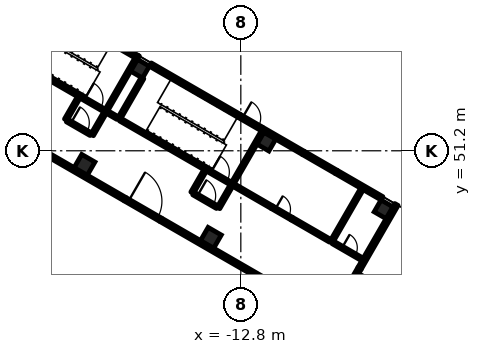
"""IFC4 building model, lengths in metres.
Left out: names, types, materials, properties, quantities, classifications, styles, units other than length and angle.
Written with IfcOpenShell. Run it as: python <this file> out.ifc"""

import sys

from ifc_helpers import new_model, si_unit, direction, frame, frame_2d, origin, origin_2d, place, context, subcontext, project, spatial, rectangle, extrude, element, fill, save


model = new_model("IFC4")
c1 = context("Model", 3, precision=1e-05, world=origin(), true_north=direction((0.0, 1.0)))
c2 = subcontext(c1, "Body", "Model", "MODEL_VIEW")
j1 = project(units=[si_unit("LENGTHUNIT", "METRE"), si_unit("PLANEANGLEUNIT", "RADIAN")], contexts=[c1])
p1 = place(None, origin())
s1 = spatial("IfcSite", under=j1, at=p1, CompositionType="ELEMENT")
p2 = place(p1, origin())
s2 = spatial("IfcBuilding", under=s1, at=p2, CompositionType="ELEMENT")
p3 = place(p2, origin())
s3 = spatial("IfcBuildingStorey", under=s2, at=p3, CompositionType="ELEMENT", Elevation=0.0)
for number, where, z_axis, x_axis in (
    (1, (-3.41, 47.349, -0.3), (0.0, 0.0, 1.0), (-0.5, -0.866, 0.0)),
    (2, (-11.118, 51.799, -0.3), (0.0, 0.0, 1.0), (-0.5, -0.866, 0.0)),
    (3, (-19.432, 56.599, -0.3), (0.0, 0.0, 1.0), (-0.5, -0.866, 0.0)),
):
    element("IfcColumn", number, at=place(p3, frame(where, z_axis=z_axis, x_axis=x_axis)), inside=s3, PredefinedType="COLUMN", context=c2, shape_type="SweptSolid", body=[
        extrude(rectangle(XDim=0.9, YDim=0.9, at=origin_2d()), origin(), (0.0, 0.0, 1.0), 6.3),
    ])
for number, where, z_axis, x_axis in (
    (4, (-14.768, 45.477, -0.3), (0.0, 0.0, 1.0), (-0.5, -0.866, 0.0)),
    (5, (-23.082, 50.277, -0.3), (0.0, 0.0, 1.0), (-0.5, -0.866, 0.0)),
):
    element("IfcColumn", number, at=place(p3, frame(where, z_axis=z_axis, x_axis=x_axis)), inside=s3, PredefinedType="COLUMN", context=c2, shape_type="SweptSolid", body=[
        extrude(rectangle(XDim=1.0, YDim=1.0, at=origin_2d()), origin(), (0.0, 0.0, 1.0), 6.3),
    ])
p4 = place(p3, frame((-2.562, 47.667, 0.0), z_axis=(0.0, 0.0, 1.0), x_axis=(-0.500010041276, -0.866019606374, 0.0)))
e6 = element("IfcWall", 6, at=p4, inside=s3, PredefinedType="SOLIDWALL", context=c2, shape_type="SweptSolid", body=[
    extrude(rectangle(XDim=4.85, YDim=0.25, at=frame_2d((2.425, 0.0))), origin(), (0.0, 0.0, 1.0), 5.7),
])
p5 = place(p3, frame((-4.988, 43.467, 0.0), z_axis=(0.0, 0.0, 1.0), x_axis=(-0.500031774688, -0.866007057882, 0.0)))
e7 = element("IfcWall", 7, at=p5, inside=s3, PredefinedType="SOLIDWALL", context=c2, shape_type="SweptSolid", body=[
    extrude(rectangle(XDim=2.3, YDim=0.25, at=frame_2d((1.15, 0.0))), origin(), (0.0, 0.0, 1.0), 5.7),
])
p6 = place(p5, frame((0.25, 0.0, 0.0)))
e8 = element("IfcOpeningElement", 8, at=p6, cuts=e7, PredefinedType="OPENING", context=c2, shape_type="SweptSolid", body=[
    extrude(rectangle(XDim=1.8, YDim=2.1, at=frame_2d((0.9, 1.05))), frame((0.0, 0.135, 0.0), z_axis=(0.0, -1.0, 0.0), x_axis=(1.0, 0.0, 0.0)), (0.0, 0.0, 1.0), 0.27),
])
p7 = place(p3, frame((-6.522, 49.809, 0.0), z_axis=(0.0, 0.0, 1.0), x_axis=(0.866055725969, -0.499947476758, 0.0)))
e9 = element("IfcWall", 9, at=p7, inside=s3, PredefinedType="SOLIDWALL", context=c2, shape_type="SweptSolid", body=[
    extrude(rectangle(XDim=3.475, YDim=0.25, at=frame_2d((1.737, 0.0))), origin(), (0.0, 0.0, 1.0), 5.7),
])
p8 = place(p3, frame((-8.687, 51.059, 0.0), z_axis=(0.0, 0.0, 1.0), x_axis=(0.866022959057, -0.500004234368, 0.0)))
e10 = element("IfcWall", 10, at=p8, inside=s3, PredefinedType="SOLIDWALL", context=c2, shape_type="SweptSolid", body=[
    extrude(rectangle(XDim=2.5, YDim=0.25, at=frame_2d((1.25, 0.0))), origin(), (0.0, 0.0, 1.0), 5.7),
])
p9 = place(p8, frame((0.25, 0.0, 0.3)))
e11 = element("IfcOpeningElement", 11, at=p9, cuts=e10, PredefinedType="OPENING", context=c2, shape_type="SweptSolid", body=[
    extrude(rectangle(XDim=2.0, YDim=2.4, at=frame_2d((1.0, 1.2))), frame((0.0, 0.135, 0.0), z_axis=(0.0, -1.0, 0.0), x_axis=(1.0, 0.0, 0.0)), (0.0, 0.0, 1.0), 0.27),
])
p10 = place(p3, frame((-11.437, 52.647, 0.0), z_axis=(0.0, 0.0, 1.0), x_axis=(0.866015284814, -0.500017526161, 0.0)))
e12 = element("IfcWall", 12, at=p10, inside=s3, PredefinedType="SOLIDWALL", context=c2, shape_type="SweptSolid", body=[
    extrude(rectangle(XDim=3.175, YDim=0.25, at=frame_2d((1.588, 0.0))), origin(), (0.0, 0.0, 1.0), 5.7),
])
p11 = place(p3, frame((-12.909, 53.497, 0.0), z_axis=(0.0, 0.0, 1.0), x_axis=(0.86605165483, -0.499954529098, 0.0)))
e13 = element("IfcWall", 13, at=p11, inside=s3, PredefinedType="SOLIDWALL", context=c2, shape_type="SweptSolid", body=[
    extrude(rectangle(XDim=1.7, YDim=0.25, at=frame_2d((0.85, 0.0))), origin(), (0.0, 0.0, 1.0), 5.7),
])
p12 = place(p11, frame((0.25, 0.0, 0.0)))
e14 = element("IfcOpeningElement", 14, at=p12, cuts=e13, PredefinedType="OPENING", context=c2, shape_type="SweptSolid", body=[
    extrude(rectangle(XDim=1.2, YDim=2.1, at=frame_2d((0.6, 1.05))), frame((0.0, 0.135, 0.0), z_axis=(0.0, -1.0, 0.0), x_axis=(1.0, 0.0, 0.0)), (0.0, 0.0, 1.0), 0.27),
])
p13 = place(p3, frame((-18.755, 56.872, 0.0), z_axis=(0.0, 0.0, 1.0), x_axis=(0.866026575979, -0.499997969693, 0.0)))
e15 = element("IfcWall", 15, at=p13, inside=s3, PredefinedType="SOLIDWALL", context=c2, shape_type="SweptSolid", body=[
    extrude(rectangle(XDim=6.75, YDim=0.25, at=frame_2d((3.375, 0.0))), origin(), (0.0, 0.0, 1.0), 5.7),
])
p14 = place(p3, frame((-21.223, 58.297, 0.0), z_axis=(0.0, 0.0, 1.0), x_axis=(0.866000971088, -0.500042316284, 0.0)))
e16 = element("IfcWall", 16, at=p14, inside=s3, PredefinedType="SOLIDWALL", context=c2, shape_type="SweptSolid", body=[
    extrude(rectangle(XDim=1.85, YDim=0.25, at=frame_2d((0.925, 0.0))), origin(), (0.0, 0.0, 1.0), 5.7),
])
p15 = place(p14, frame((0.25, 0.0, 0.0)))
e17 = element("IfcOpeningElement", 17, at=p15, cuts=e16, PredefinedType="OPENING", context=c2, shape_type="SweptSolid", body=[
    extrude(rectangle(XDim=1.2, YDim=2.1, at=frame_2d((0.6, 1.05))), frame((0.0, 0.135, 0.0), z_axis=(0.0, -1.0, 0.0), x_axis=(1.0, 0.0, 0.0)), (0.0, 0.0, 1.0), 0.27),
])
p16 = place(p3, frame((-19.621, 57.372, 0.0), z_axis=(0.0, 0.0, 1.0), x_axis=(0.867038199201, -0.4982416694, 0.0)))
e18 = element("IfcWall", 18, at=p16, inside=s3, PredefinedType="SOLIDWALL", context=c2, shape_type="SweptSolid", body=[
    extrude(rectangle(XDim=0.1, YDim=0.25, at=frame_2d((0.05, 0.0))), origin(), (0.0, 0.0, 1.0), 5.7),
])
p17 = place(p3, frame((-11.369, 52.463, 0.0), z_axis=(0.0, 0.0, 1.0), x_axis=(-0.50002537861, -0.866010750942, 0.0)))
e19 = element("IfcWall", 19, at=p17, inside=s3, PredefinedType="SOLIDWALL", context=c2, shape_type="SweptSolid", body=[
    extrude(rectangle(XDim=4.0, YDim=0.2, at=frame_2d((2.0, 0.0))), origin(), (0.0, 0.0, 1.0), 5.7),
])
p18 = place(p3, frame((-19.267, 55.984, 0.0), z_axis=(0.0, 0.0, 1.0), x_axis=(-0.49999285859, -0.86602952684, 0.0)))
e20 = element("IfcWall", 20, at=p18, inside=s3, PredefinedType="SOLIDWALL", context=c2, shape_type="SweptSolid", body=[
    extrude(rectangle(XDim=3.1, YDim=0.2, at=frame_2d((1.55, 0.0))), origin(), (0.0, 0.0, 1.0), 5.7),
])
p19 = place(p3, frame((-19.683, 57.263, 0.0), z_axis=(0.0, 0.0, 1.0), x_axis=(-0.49999894854, -0.866026010844, 0.0)))
e21 = element("IfcWall", 21, at=p19, inside=s3, PredefinedType="SOLIDWALL", context=c2, shape_type="SweptSolid", body=[
    extrude(rectangle(XDim=4.0, YDim=0.2, at=frame_2d((2.0, 0.0))), origin(), (0.0, 0.0, 1.0), 5.7),
])
p20 = place(p3, frame((-14.972, 49.924, 0.0), z_axis=(0.0, 0.0, 1.0), x_axis=(0.866036909293, -0.499980071345, 0.0)))
e22 = element("IfcWall", 22, at=p20, inside=s3, PredefinedType="SOLIDWALL", context=c2, shape_type="SweptSolid", body=[
    extrude(rectangle(XDim=1.75, YDim=0.2, at=frame_2d((0.875, 0.0))), origin(), (0.0, 0.0, 1.0), 5.7),
])
p21 = place(p20, frame((0.25, 0.0, 0.0)))
e23 = element("IfcOpeningElement", 23, at=p21, cuts=e22, PredefinedType="OPENING", context=c2, shape_type="SweptSolid", body=[
    extrude(rectangle(XDim=1.2, YDim=2.1, at=frame_2d((0.6, 1.05))), frame((0.0, 0.11, 0.0), z_axis=(0.0, -1.0, 0.0), x_axis=(1.0, 0.0, 0.0)), (0.0, 0.0, 1.0), 0.22),
])
p22 = place(p3, frame((-14.972, 49.924, 0.0), z_axis=(0.0, 0.0, 1.0), x_axis=(-0.86601134256, 0.500024353964, 0.0)))
e24 = element("IfcWall", 24, at=p22, inside=s3, PredefinedType="SOLIDWALL", context=c2, shape_type="SweptSolid", body=[
    extrude(rectangle(XDim=6.65, YDim=0.2, at=frame_2d((3.325, 0.0))), origin(), (0.0, 0.0, 1.0), 5.7),
])
p23 = place(p3, frame((-23.285, 54.724, 0.0), z_axis=(0.0, 0.0, 1.0), x_axis=(0.866002029911, -0.500040482552, 0.0)))
e25 = element("IfcWall", 25, at=p23, inside=s3, PredefinedType="SOLIDWALL", context=c2, shape_type="SweptSolid", body=[
    extrude(rectangle(XDim=1.75, YDim=0.2, at=frame_2d((0.875, 0.0))), origin(), (0.0, 0.0, 1.0), 5.7),
])
p24 = place(p23, frame((0.25, 0.0, 0.0)))
e26 = element("IfcOpeningElement", 26, at=p24, cuts=e25, PredefinedType="OPENING", context=c2, shape_type="SweptSolid", body=[
    extrude(rectangle(XDim=1.2, YDim=2.1, at=frame_2d((0.6, 1.05))), frame((0.0, 0.11, 0.0), z_axis=(0.0, -1.0, 0.0), x_axis=(1.0, 0.0, 0.0)), (0.0, 0.0, 1.0), 0.22),
])
p25 = place(p3, frame((-23.285, 54.724, 0.0), z_axis=(0.0, 0.0, 1.0), x_axis=(-0.866027239912, 0.49999681972, 0.0)))
e27 = element("IfcWall", 27, at=p25, inside=s3, PredefinedType="SOLIDWALL", context=c2, shape_type="SweptSolid", body=[
    extrude(rectangle(XDim=6.65, YDim=0.2, at=frame_2d((3.325, 0.0))), origin(), (0.0, 0.0, 1.0), 5.7),
])
p26 = place(p3, frame((-13.419, 48.913, 0.0), z_axis=(0.0, 0.0, 1.0), x_axis=(-0.500000056704, -0.866025371046, 0.0)))
e28 = element("IfcWall", 28, at=p26, inside=s3, PredefinedType="PARTITIONING", context=c2, shape_type="SweptSolid", body=[
    extrude(rectangle(XDim=1.7, YDim=0.2, at=frame_2d((0.85, 0.0))), origin(), (0.0, 0.0, 1.0), 5.1),
])
for number, where, z_axis, x_axis in (
    (29, (-15.152, 49.913, 0.0), (0.0, 0.0, 1.0), (-0.5, -0.866, 0.0)),
    (30, (-21.733, 53.713, 0.0), (0.0, 0.0, 1.0), (-0.5, -0.866, 0.0)),
):
    element("IfcWall", number, at=place(p3, frame(where, z_axis=z_axis, x_axis=x_axis)), inside=s3, PredefinedType="PARTITIONING", context=c2, shape_type="SweptSolid", body=[
        extrude(rectangle(XDim=1.7, YDim=0.2, at=frame_2d((0.85, 0.0))), origin(), (0.0, 0.0, 1.0), 5.1),
    ])
p27 = place(p3, frame((-23.465, 54.713, 0.0), z_axis=(0.0, 0.0, 1.0), x_axis=(-0.500000056704, -0.866025371046, 0.0)))
e31 = element("IfcWall", 31, at=p27, inside=s3, PredefinedType="PARTITIONING", context=c2, shape_type="SweptSolid", body=[
    extrude(rectangle(XDim=1.7, YDim=0.2, at=frame_2d((0.85, 0.0))), origin(), (0.0, 0.0, 1.0), 5.1),
])
p28 = place(p3, frame((-15.915, 48.39, 0.0), z_axis=(0.0, 0.0, 1.0), x_axis=(0.866013897511, -0.50001992892, 0.0)))
e32 = element("IfcWall", 32, at=p28, inside=s3, PredefinedType="PARTITIONING", context=c2, shape_type="SweptSolid", body=[
    extrude(rectangle(XDim=1.8, YDim=0.2, at=frame_2d((0.9, 0.0))), origin(), (0.0, 0.0, 1.0), 5.1),
])
p29 = place(p28, frame((0.3, 0.0, 0.0)))
e33 = element("IfcOpeningElement", 33, at=p29, cuts=e32, PredefinedType="OPENING", context=c2, shape_type="SweptSolid", body=[
    extrude(rectangle(XDim=1.2, YDim=2.1, at=frame_2d((0.6, 1.05))), frame((0.0, 0.11, 0.0), z_axis=(0.0, -1.0, 0.0), x_axis=(1.0, 0.0, 0.0)), (0.0, 0.0, 1.0), 0.22),
])
p30 = place(p3, frame((-24.229, 53.19, 0.0), z_axis=(0.0, 0.0, 1.0), x_axis=(0.866047807691, -0.499961193289, 0.0)))
e34 = element("IfcWall", 34, at=p30, inside=s3, PredefinedType="PARTITIONING", context=c2, shape_type="SweptSolid", body=[
    extrude(rectangle(XDim=1.8, YDim=0.2, at=frame_2d((0.9, 0.0))), origin(), (0.0, 0.0, 1.0), 5.1),
])
p31 = place(p30, frame((0.3, 0.0, 0.0)))
e35 = element("IfcOpeningElement", 35, at=p31, cuts=e34, PredefinedType="OPENING", context=c2, shape_type="SweptSolid", body=[
    extrude(rectangle(XDim=1.2, YDim=2.1, at=frame_2d((0.6, 1.05))), frame((0.0, 0.11, 0.0), z_axis=(0.0, -1.0, 0.0), x_axis=(1.0, 0.0, 0.0)), (0.0, 0.0, 1.0), 0.22),
])
p32 = place(p3, frame((-6.983, 40.26, 0.0), z_axis=(0.0, 0.0, 1.0), x_axis=(-0.866025499775, 0.499999833739, 0.0)))
e36 = element("IfcWall", 36, at=p32, inside=s3, PredefinedType="SOLIDWALL", context=c2, shape_type="SweptSolid", body=[
    extrude(rectangle(XDim=12.8, YDim=0.25, at=frame_2d((6.4, 0.0))), origin(), (0.0, 0.0, 1.0), 5.1),
])
p33 = place(p3, frame((-20.407, 48.01, 0.0), z_axis=(0.0, 0.0, 1.0), x_axis=(0.866019956843, -0.50000943426, 0.0)))
e37 = element("IfcWall", 37, at=p33, inside=s3, PredefinedType="SOLIDWALL", context=c2, shape_type="SweptSolid", body=[
    extrude(rectangle(XDim=2.7, YDim=0.25, at=frame_2d((1.35, 0.0))), origin(), (0.0, 0.0, 1.0), 5.1),
])
p34 = place(p33, frame((0.25, 0.0, 0.0)))
e38 = element("IfcOpeningElement", 38, at=p34, cuts=e37, PredefinedType="OPENING", context=c2, shape_type="SweptSolid", body=[
    extrude(rectangle(XDim=2.2, YDim=2.1, at=frame_2d((1.1, 1.05))), frame((0.0, 0.135, 0.0), z_axis=(0.0, -1.0, 0.0), x_axis=(1.0, 0.0, 0.0)), (0.0, 0.0, 1.0), 0.27),
])
p35 = place(p3, frame((-20.407, 48.01, 0.0), z_axis=(0.0, 0.0, 1.0), x_axis=(-0.866028853923, 0.499994024137, 0.0)))
e39 = element("IfcWall", 39, at=p35, inside=s3, PredefinedType="SOLIDWALL", context=c2, shape_type="SweptSolid", body=[
    extrude(rectangle(XDim=6.9, YDim=0.25, at=frame_2d((3.45, 0.0))), origin(), (0.0, 0.0, 1.0), 5.1),
])
p36 = place(p3, frame((-4.831, 48.688, 0.0), z_axis=(0.0, 0.0, 1.0), x_axis=(-0.49999894854, -0.866026010844, 0.0)))
e40 = element("IfcWall", 40, at=p36, inside=s3, PredefinedType="PARTITIONING", context=c2, shape_type="SweptSolid", body=[
    extrude(rectangle(XDim=4.0, YDim=0.2, at=frame_2d((2.0, 0.0))), origin(), (0.0, 0.0, 1.0), 5.1),
])
p37 = place(p3, frame((-6.744, 45.174, 0.0), z_axis=(0.0, 0.0, 1.0), x_axis=(0.866017533419, -0.500013631625, 0.0)))
e41 = element("IfcWall", 41, at=p37, inside=s3, PredefinedType="PARTITIONING", context=c2, shape_type="SweptSolid", body=[
    extrude(rectangle(XDim=2.25, YDim=0.2, at=frame_2d((1.125, 0.0))), origin(), (0.0, 0.0, 1.0), 5.1),
])
p38 = place(p37, frame((0.7, 0.0, 0.0)))
e42 = element("IfcOpeningElement", 42, at=p38, cuts=e41, PredefinedType="OPENING", context=c2, shape_type="SweptSolid", body=[
    extrude(rectangle(XDim=1.0, YDim=2.1, at=frame_2d((0.5, 1.05))), frame((0.0, 0.11, 0.0), z_axis=(0.0, -1.0, 0.0), x_axis=(1.0, 0.0, 0.0)), (0.0, 0.0, 1.0), 0.22),
])
p39 = place(p3, frame((-6.917, 45.274, 0.0), z_axis=(0.0, 0.0, 1.0), x_axis=(-0.866046596414, 0.499963291492, 0.0)))
e43 = element("IfcWall", 43, at=p39, inside=s3, PredefinedType="PARTITIONING", context=c2, shape_type="SweptSolid", body=[
    extrude(rectangle(XDim=2.925, YDim=0.2, at=frame_2d((1.462, 0.0))), origin(), (0.0, 0.0, 1.0), 5.1),
])
p40 = place(p3, frame((-10.75, 47.487, 0.0), z_axis=(0.0, 0.0, 1.0), x_axis=(0.866031096941, -0.499990139034, 0.0)))
e44 = element("IfcWall", 44, at=p40, inside=s3, PredefinedType="PARTITIONING", context=c2, shape_type="SweptSolid", body=[
    extrude(rectangle(XDim=1.5, YDim=0.2, at=frame_2d((0.75, 0.0))), origin(), (0.0, 0.0, 1.0), 5.1),
])
p41 = place(p40, frame((0.25, 0.0, 0.0)))
e45 = element("IfcOpeningElement", 45, at=p41, cuts=e44, PredefinedType="OPENING", context=c2, shape_type="SweptSolid", body=[
    extrude(rectangle(XDim=1.0, YDim=2.1, at=frame_2d((0.5, 1.05))), frame((0.0, 0.11, 0.0), z_axis=(0.0, -1.0, 0.0), x_axis=(1.0, 0.0, 0.0)), (0.0, 0.0, 1.0), 0.22),
])
p42 = place(p3, frame((-10.75, 47.487, 0.0), z_axis=(0.0, 0.0, 1.0), x_axis=(-0.86601045545, 0.500025890382, 0.0)))
e46 = element("IfcWall", 46, at=p42, inside=s3, PredefinedType="PARTITIONING", context=c2, shape_type="SweptSolid", body=[
    extrude(rectangle(XDim=2.925, YDim=0.2, at=frame_2d((1.462, 0.0))), origin(), (0.0, 0.0, 1.0), 5.1),
])
p43 = place(p3, frame((-20.904, 53.349, 0.0), z_axis=(0.0, 0.0, 1.0), x_axis=(-0.865961984968, 0.500109828528, 0.0)))
e47 = element("IfcWall", 47, at=p43, inside=s3, PredefinedType="PARTITIONING", context=c2, shape_type="SweptSolid", body=[
    extrude(rectangle(XDim=0.8, YDim=0.2, at=frame_2d((0.4, 0.0))), origin(), (0.0, 0.0, 1.0), 5.1),
])
p44 = place(p6, origin())
e48 = element("IfcDoor", 48, at=p44, inside=s3, OperationType="DOUBLE_DOOR_SINGLE_SWING", PredefinedType="DOOR", context=c2, shape_type="SweptSolid", body=[
    extrude(rectangle(XDim=1.8, YDim=2.1, at=frame_2d((0.9, 1.05))), frame((0.0, 0.025, 0.0), z_axis=(0.0, -1.0, 0.0), x_axis=(1.0, 0.0, 0.0)), (0.0, 0.0, 1.0), 0.05),
])
fill(e8, e48)
p45 = place(p9, origin())
e49 = element("IfcWindow", 49, at=p45, inside=s3, PartitioningType="SINGLE_PANEL", PredefinedType="WINDOW", context=c2, shape_type="SweptSolid", body=[
    extrude(rectangle(XDim=2.0, YDim=2.4, at=frame_2d((1.0, 1.2))), frame((0.0, 0.03, 0.0), z_axis=(0.0, -1.0, 0.0), x_axis=(1.0, 0.0, 0.0)), (0.0, 0.0, 1.0), 0.06),
])
fill(e11, e49)
p46 = place(p12, origin())
e50 = element("IfcDoor", 50, at=p46, inside=s3, OperationType="SINGLE_SWING_LEFT", PredefinedType="DOOR", context=c2, shape_type="SweptSolid", body=[
    extrude(rectangle(XDim=1.2, YDim=2.1, at=frame_2d((0.6, 1.05))), frame((0.0, 0.025, 0.0), z_axis=(0.0, -1.0, 0.0), x_axis=(1.0, 0.0, 0.0)), (0.0, 0.0, 1.0), 0.05),
])
fill(e14, e50)
p47 = place(p15, origin())
e51 = element("IfcDoor", 51, at=p47, inside=s3, OperationType="SINGLE_SWING_LEFT", PredefinedType="DOOR", context=c2, shape_type="SweptSolid", body=[
    extrude(rectangle(XDim=1.2, YDim=2.1, at=frame_2d((0.6, 1.05))), frame((0.0, 0.025, 0.0), z_axis=(0.0, -1.0, 0.0), x_axis=(1.0, 0.0, 0.0)), (0.0, 0.0, 1.0), 0.05),
])
fill(e17, e51)
p48 = place(p21, origin())
e52 = element("IfcDoor", 52, at=p48, inside=s3, OperationType="SINGLE_SWING_LEFT", PredefinedType="DOOR", context=c2, shape_type="SweptSolid", body=[
    extrude(rectangle(XDim=1.2, YDim=2.1, at=frame_2d((0.6, 1.05))), frame((0.0, 0.025, 0.0), z_axis=(0.0, -1.0, 0.0), x_axis=(1.0, 0.0, 0.0)), (0.0, 0.0, 1.0), 0.05),
])
fill(e23, e52)
p49 = place(p24, origin())
e53 = element("IfcDoor", 53, at=p49, inside=s3, OperationType="SINGLE_SWING_LEFT", PredefinedType="DOOR", context=c2, shape_type="SweptSolid", body=[
    extrude(rectangle(XDim=1.2, YDim=2.1, at=frame_2d((0.6, 1.05))), frame((0.0, 0.025, 0.0), z_axis=(0.0, -1.0, 0.0), x_axis=(1.0, 0.0, 0.0)), (0.0, 0.0, 1.0), 0.05),
])
fill(e26, e53)
p50 = place(p29, origin())
e54 = element("IfcDoor", 54, at=p50, inside=s3, OperationType="SINGLE_SWING_LEFT", PredefinedType="DOOR", context=c2, shape_type="SweptSolid", body=[
    extrude(rectangle(XDim=1.2, YDim=2.1, at=frame_2d((0.6, 1.05))), frame((0.0, 0.025, 0.0), z_axis=(0.0, -1.0, 0.0), x_axis=(1.0, 0.0, 0.0)), (0.0, 0.0, 1.0), 0.05),
])
fill(e33, e54)
p51 = place(p31, origin())
e55 = element("IfcDoor", 55, at=p51, inside=s3, OperationType="SINGLE_SWING_LEFT", PredefinedType="DOOR", context=c2, shape_type="SweptSolid", body=[
    extrude(rectangle(XDim=1.2, YDim=2.1, at=frame_2d((0.6, 1.05))), frame((0.0, 0.025, 0.0), z_axis=(0.0, -1.0, 0.0), x_axis=(1.0, 0.0, 0.0)), (0.0, 0.0, 1.0), 0.05),
])
fill(e35, e55)
p52 = place(p34, origin())
e56 = element("IfcDoor", 56, at=p52, inside=s3, OperationType="DOUBLE_DOOR_SINGLE_SWING", PredefinedType="DOOR", context=c2, shape_type="SweptSolid", body=[
    extrude(rectangle(XDim=2.2, YDim=2.1, at=frame_2d((1.1, 1.05))), frame((0.0, 0.025, 0.0), z_axis=(0.0, -1.0, 0.0), x_axis=(1.0, 0.0, 0.0)), (0.0, 0.0, 1.0), 0.05),
])
fill(e38, e56)
p53 = place(p38, origin())
e57 = element("IfcDoor", 57, at=p53, inside=s3, OperationType="SINGLE_SWING_LEFT", PredefinedType="DOOR", context=c2, shape_type="SweptSolid", body=[
    extrude(rectangle(XDim=1.0, YDim=2.1, at=frame_2d((0.5, 1.05))), frame((0.0, 0.025, 0.0), z_axis=(0.0, -1.0, 0.0), x_axis=(1.0, 0.0, 0.0)), (0.0, 0.0, 1.0), 0.05),
])
fill(e42, e57)
p54 = place(p41, origin())
e58 = element("IfcDoor", 58, at=p54, inside=s3, OperationType="SINGLE_SWING_LEFT", PredefinedType="DOOR", context=c2, shape_type="SweptSolid", body=[
    extrude(rectangle(XDim=1.0, YDim=2.1, at=frame_2d((0.5, 1.05))), frame((0.0, 0.025, 0.0), z_axis=(0.0, -1.0, 0.0), x_axis=(1.0, 0.0, 0.0)), (0.0, 0.0, 1.0), 0.05),
])
fill(e45, e58)
save(model, sys.argv[1])
